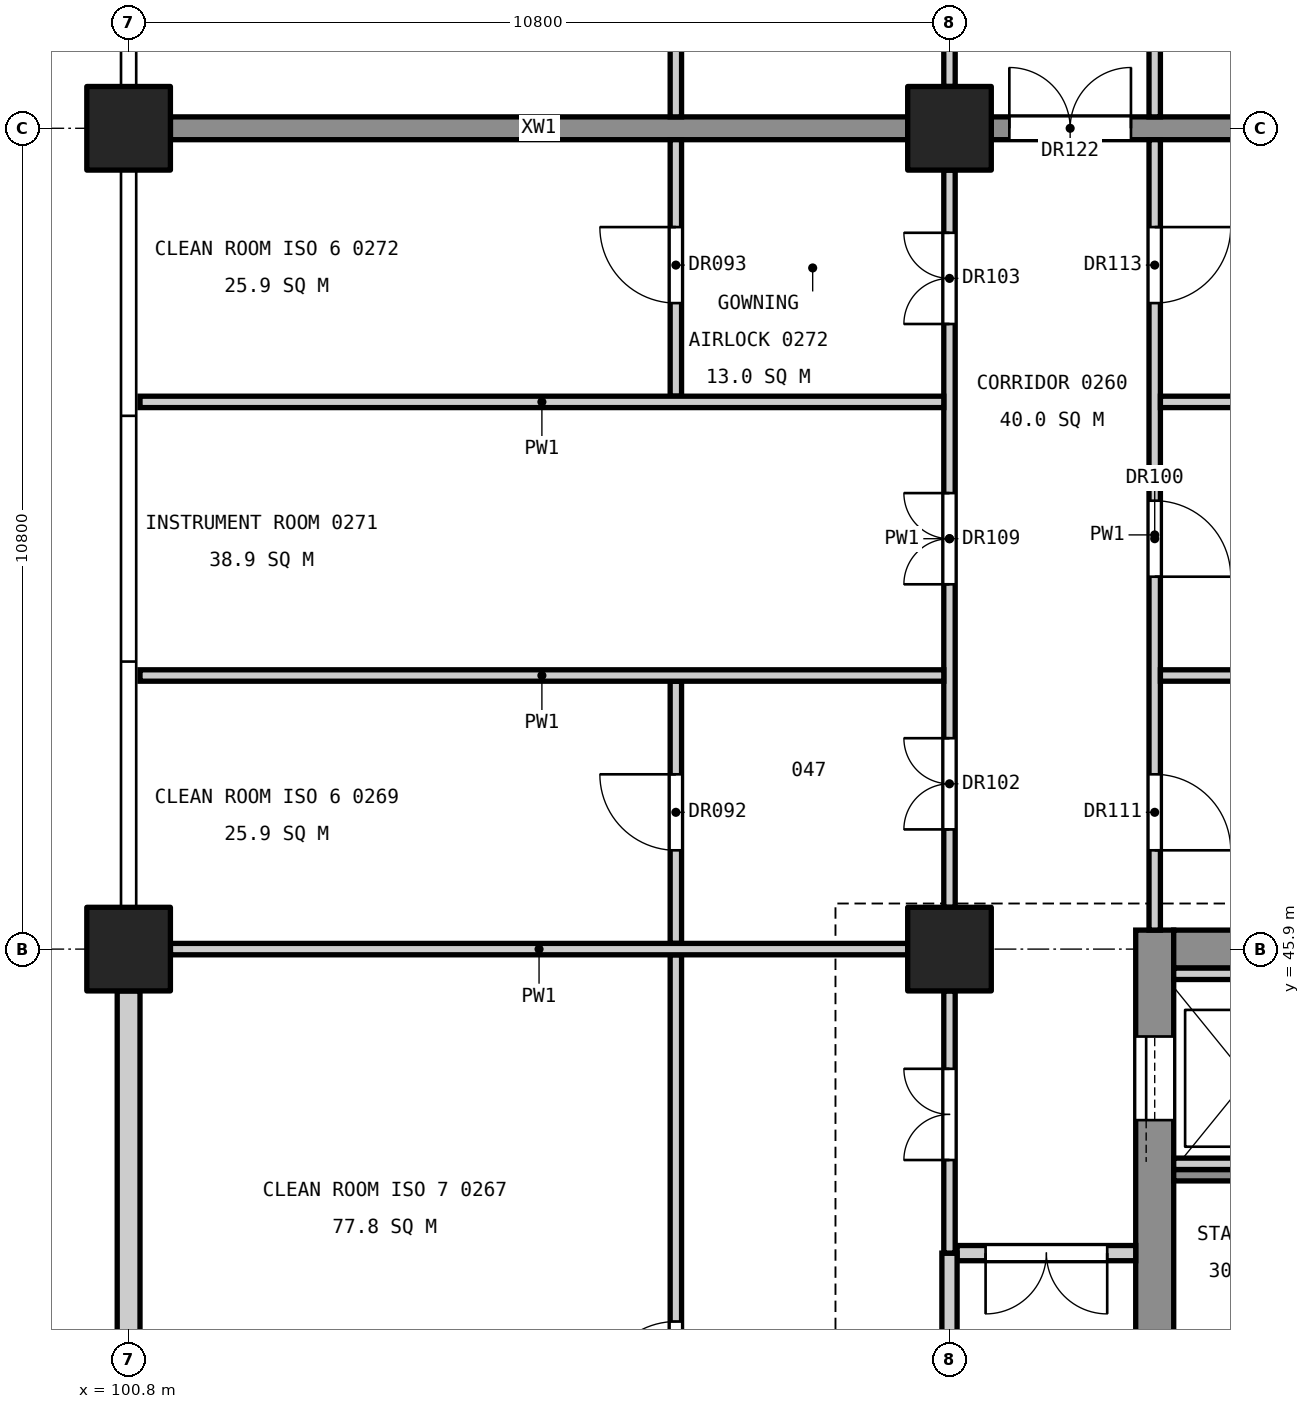
"""IFC4 building model, lengths in metres.
Left out: names, types, materials, properties, quantities, classifications, styles, units other than length and angle.
Written with IfcOpenShell. Run it as: python <this file> out.ifc"""

import sys

from ifc_helpers import new_model, si_unit, direction, frame, frame_2d, origin, origin_2d, place, context, subcontext, project, spatial, rectangle, extrude, element, fill, save


model = new_model("IFC4")
c1 = context("Model", 3, precision=1e-05, world=origin(), true_north=direction((0.0, 1.0)))
c2 = subcontext(c1, "Body", "Model", "MODEL_VIEW")
j1 = project(units=[si_unit("LENGTHUNIT", "METRE"), si_unit("PLANEANGLEUNIT", "RADIAN")], contexts=[c1])
p1 = place(None, origin())
s1 = spatial("IfcSite", under=j1, at=p1, CompositionType="ELEMENT")
p2 = place(p1, origin())
s2 = spatial("IfcBuilding", under=s1, at=p2, CompositionType="ELEMENT")
p3 = place(p2, frame((0.0, 0.0, 11.4)))
s3 = spatial("IfcBuildingStorey", under=s2, at=p3, CompositionType="ELEMENT", Elevation=11.4)
for number, where, z_axis, x_axis in (
    (1, (111.6, 45.9, 0.0), (0.0, 0.0, 1.0), (1.0, 0.0, 0.0)),
    (2, (111.6, 56.7, 0.0), (0.0, 0.0, 1.0), (1.0, 0.0, 0.0)),
    (3, (100.8, 45.9, 0.0), (0.0, 0.0, 1.0), (1.0, 0.0, 0.0)),
    (4, (100.8, 56.7, 0.0), (0.0, 0.0, 1.0), (1.0, 0.0, 0.0)),
):
    element("IfcColumn", number, at=place(p3, frame(where, z_axis=z_axis, x_axis=x_axis)), inside=s3, PredefinedType="COLUMN", context=c2, shape_type="SweptSolid", body=[
        extrude(rectangle(XDim=1.1, YDim=1.1, at=origin_2d()), origin(), (0.0, 0.0, 1.0), 5.4),
    ])
p4 = place(p3, frame((114.3, 34.85, 0.0), z_axis=(0.0, 0.0, 1.0), x_axis=(0.0, 1.0, 0.0)))
e5 = element("IfcWall", 5, at=p4, inside=s3, PredefinedType="SHEAR", context=c2, shape_type="SweptSolid", body=[
    extrude(rectangle(XDim=11.3, YDim=0.5, at=frame_2d((5.65, 0.0))), origin(), (0.0, 0.0, 1.0), 5.1),
])
p5 = place(p4, frame((0.55, 0.0, 0.0)))
e6 = element("IfcOpeningElement", 6, at=p5, cuts=e5, PredefinedType="OPENING", context=c2, shape_type="SweptSolid", body=[
    extrude(rectangle(XDim=1.4, YDim=2.1, at=frame_2d((0.7, 1.05))), frame((0.0, 0.26, 0.0), z_axis=(0.0, -1.0, 0.0), x_axis=(1.0, 0.0, 0.0)), (0.0, 0.0, 1.0), 0.52),
])
p6 = place(p4, frame((8.8, 0.0, 0.0)))
e7 = element("IfcOpeningElement", 7, at=p6, cuts=e5, PredefinedType="OPENING", context=c2, shape_type="SweptSolid", body=[
    extrude(rectangle(XDim=1.1, YDim=2.1, at=frame_2d((0.55, 1.05))), frame((0.0, 0.26, 0.0), z_axis=(0.0, -1.0, 0.0), x_axis=(1.0, 0.0, 0.0)), (0.0, 0.0, 1.0), 0.52),
])
p7 = place(p3, frame((118.55, 45.9, 0.0), z_axis=(0.0, 0.0, 1.0), x_axis=(-1.0, 0.0, 0.0)))
e8 = element("IfcWall", 8, at=p7, inside=s3, PredefinedType="SHEAR", context=c2, shape_type="SweptSolid", body=[
    extrude(rectangle(XDim=4.0, YDim=0.5, at=frame_2d((2.0, 0.0))), origin(), (0.0, 0.0, 1.0), 5.1),
])
p8 = place(p3, frame((118.25, 56.7, 0.0), z_axis=(0.0, 0.0, 1.0), x_axis=(-1.0, 0.0, 0.0)))
e9 = element("IfcWall", 9, at=p8, inside=s3, PredefinedType="SHEAR", context=c2, shape_type="SweptSolid", body=[
    extrude(rectangle(XDim=6.1, YDim=0.3, at=frame_2d((3.05, 0.0))), origin(), (0.0, 0.0, 1.0), 5.1),
])
p9 = place(p8, frame((4.262, 0.0, 0.0)))
e10 = element("IfcOpeningElement", 10, at=p9, cuts=e9, PredefinedType="OPENING", context=c2, shape_type="SweptSolid", body=[
    extrude(rectangle(XDim=1.6, YDim=2.1, at=frame_2d((0.8, 1.05))), frame((0.0, 0.16, 0.0), z_axis=(0.0, -1.0, 0.0), x_axis=(1.0, 0.0, 0.0)), (0.0, 0.0, 1.0), 0.32),
])
p10 = place(p3, frame((111.05, 56.7, 0.0), z_axis=(0.0, 0.0, 1.0), x_axis=(-1.0, 0.0, 0.0)))
e11 = element("IfcWall", 11, at=p10, inside=s3, PredefinedType="SHEAR", context=c2, shape_type="SweptSolid", body=[
    extrude(rectangle(XDim=9.7, YDim=0.3, at=frame_2d((4.85, 0.0))), origin(), (0.0, 0.0, 1.0), 5.1),
])
p11 = place(p3, frame((118.55, 42.925, 0.0), z_axis=(0.0, 0.0, 1.0), x_axis=(-1.0, 0.0, 0.0)))
e12 = element("IfcWall", 12, at=p11, inside=s3, PredefinedType="SOLIDWALL", context=c2, shape_type="SweptSolid", body=[
    extrude(rectangle(XDim=4.0, YDim=0.15, at=frame_2d((2.0, 0.0))), origin(), (0.0, 0.0, 1.0), 5.1),
])
for number, where, z_axis, x_axis in (
    (13, (116.35, 43.075, 0.0), (0.0, 0.0, 1.0), (-1.0, 0.0, 0.0)),
    (14, (116.35, 45.575, 0.0), (0.0, 0.0, 1.0), (-1.0, 0.0, 0.0)),
):
    element("IfcWall", number, at=place(p3, frame(where, z_axis=z_axis, x_axis=x_axis)), inside=s3, PredefinedType="SOLIDWALL", context=c2, shape_type="SweptSolid", body=[
        extrude(rectangle(XDim=1.8, YDim=0.15, at=frame_2d((0.9, 0.0))), origin(), (0.0, 0.0, 1.0), 5.4),
    ])
p12 = place(p3, frame((100.8, 35.65, 0.0), z_axis=(0.0, 0.0, 1.0), x_axis=(0.0, 1.0, 0.0)))
e15 = element("IfcWall", 15, at=p12, inside=s3, PredefinedType="STANDARD", context=c2, shape_type="SweptSolid", body=[
    extrude(rectangle(XDim=9.7, YDim=0.3, at=frame_2d((4.85, 0.0))), origin(), (0.0, 0.0, 1.0), 4.0),
])
p13 = place(p3, frame((114.3, 46.15, 0.0), z_axis=(0.0, 0.0, 1.0), x_axis=(0.0, 1.0, 0.0)))
e16 = element("IfcWall", 16, at=p13, inside=s3, PredefinedType="PARTITIONING", context=c2, shape_type="SweptSolid", body=[
    extrude(rectangle(XDim=10.4, YDim=0.15, at=frame_2d((5.2, 0.0))), origin(), (0.0, 0.0, 1.0), 4.0),
])
p14 = place(p13, frame((4.65, 0.0, 0.0)))
e17 = element("IfcOpeningElement", 17, at=p14, cuts=e16, PredefinedType="OPENING", context=c2, shape_type="SweptSolid", body=[
    extrude(rectangle(XDim=1.0, YDim=2.1, at=frame_2d((0.5, 1.05))), frame((0.0, 0.085, 0.0), z_axis=(0.0, -1.0, 0.0), x_axis=(1.0, 0.0, 0.0)), (0.0, 0.0, 1.0), 0.17),
])
p15 = place(p13, frame((1.05, 0.0, 0.0)))
e18 = element("IfcOpeningElement", 18, at=p15, cuts=e16, PredefinedType="OPENING", context=c2, shape_type="SweptSolid", body=[
    extrude(rectangle(XDim=1.0, YDim=2.1, at=frame_2d((0.5, 1.05))), frame((0.0, 0.085, 0.0), z_axis=(0.0, -1.0, 0.0), x_axis=(1.0, 0.0, 0.0)), (0.0, 0.0, 1.0), 0.17),
])
p16 = place(p13, frame((8.25, 0.0, 0.0)))
e19 = element("IfcOpeningElement", 19, at=p16, cuts=e16, PredefinedType="OPENING", context=c2, shape_type="SweptSolid", body=[
    extrude(rectangle(XDim=1.0, YDim=2.1, at=frame_2d((0.5, 1.05))), frame((0.0, 0.085, 0.0), z_axis=(0.0, -1.0, 0.0), x_axis=(1.0, 0.0, 0.0)), (0.0, 0.0, 1.0), 0.17),
])
p17 = place(p3, frame((114.3, 56.85, 0.0), z_axis=(0.0, 0.0, 1.0), x_axis=(0.0, 1.0, 0.0)))
e20 = element("IfcWall", 20, at=p17, inside=s3, PredefinedType="PARTITIONING", context=c2, shape_type="SweptSolid", body=[
    extrude(rectangle(XDim=3.2, YDim=0.15, at=frame_2d((1.6, 0.0))), origin(), (0.0, 0.0, 1.0), 4.0),
])
p18 = place(p17, frame((1.15, 0.0, 0.0)))
e21 = element("IfcOpeningElement", 21, at=p18, cuts=e20, PredefinedType="OPENING", context=c2, shape_type="SweptSolid", body=[
    extrude(rectangle(XDim=1.0, YDim=2.1, at=frame_2d((0.5, 1.05))), frame((0.0, 0.085, 0.0), z_axis=(0.0, -1.0, 0.0), x_axis=(1.0, 0.0, 0.0)), (0.0, 0.0, 1.0), 0.17),
])
for number, where, z_axis, x_axis in (
    (22, (118.65, 49.5, 0.0), (0.0, 0.0, 1.0), (-1.0, 0.0, 0.0)),
    (23, (118.65, 53.1, 0.0), (0.0, 0.0, 1.0), (-1.0, 0.0, 0.0)),
):
    element("IfcWall", number, at=place(p3, frame(where, z_axis=z_axis, x_axis=x_axis)), inside=s3, PredefinedType="PARTITIONING", context=c2, shape_type="SweptSolid", body=[
        extrude(rectangle(XDim=4.275, YDim=0.15, at=frame_2d((2.137, 0.0))), origin(), (0.0, 0.0, 1.0), 4.3),
    ])
p19 = place(p3, frame((114.05, 41.9, 0.0), z_axis=(0.0, 0.0, 1.0), x_axis=(-1.0, 0.0, 0.0)))
e24 = element("IfcWall", 24, at=p19, inside=s3, PredefinedType="PARTITIONING", context=c2, shape_type="SweptSolid", body=[
    extrude(rectangle(XDim=2.35, YDim=0.2, at=frame_2d((1.175, 0.0))), origin(), (0.0, 0.0, 1.0), 4.0),
])
p20 = place(p19, frame((0.375, 0.0, 0.0)))
e25 = element("IfcOpeningElement", 25, at=p20, cuts=e24, PredefinedType="OPENING", context=c2, shape_type="SweptSolid", body=[
    extrude(rectangle(XDim=1.6, YDim=2.1, at=frame_2d((0.8, 1.05))), frame((0.0, 0.11, 0.0), z_axis=(0.0, -1.0, 0.0), x_axis=(1.0, 0.0, 0.0)), (0.0, 0.0, 1.0), 0.22),
])
p21 = place(p3, frame((111.6, 35.65, 0.0), z_axis=(0.0, 0.0, 1.0), x_axis=(0.0, 1.0, 0.0)))
e26 = element("IfcWall", 26, at=p21, inside=s3, PredefinedType="PARTITIONING", context=c2, shape_type="SweptSolid", body=[
    extrude(rectangle(XDim=6.25, YDim=0.2, at=frame_2d((3.125, 0.0))), origin(), (0.0, 0.0, 1.0), 4.0),
])
p22 = place(p3, frame((111.6, 41.9, 0.0), z_axis=(0.0, 0.0, 1.0), x_axis=(0.0, 1.0, 0.0)))
e27 = element("IfcWall", 27, at=p22, inside=s3, PredefinedType="PARTITIONING", context=c2, shape_type="SweptSolid", body=[
    extrude(rectangle(XDim=3.45, YDim=0.15, at=frame_2d((1.725, 0.0))), origin(), (0.0, 0.0, 1.0), 4.0),
])
p23 = place(p22, frame((1.225, 0.0, 0.0)))
e28 = element("IfcOpeningElement", 28, at=p23, cuts=e27, PredefinedType="OPENING", context=c2, shape_type="SweptSolid", body=[
    extrude(rectangle(XDim=1.2, YDim=2.1, at=frame_2d((0.6, 1.05))), frame((0.0, 0.085, 0.0), z_axis=(0.0, -1.0, 0.0), x_axis=(1.0, 0.0, 0.0)), (0.0, 0.0, 1.0), 0.17),
])
p24 = place(p3, frame((111.6, 46.45, 0.0), z_axis=(0.0, 0.0, 1.0), x_axis=(0.0, 1.0, 0.0)))
e29 = element("IfcWall", 29, at=p24, inside=s3, PredefinedType="PARTITIONING", context=c2, shape_type="SweptSolid", body=[
    extrude(rectangle(XDim=9.7, YDim=0.15, at=frame_2d((4.85, 0.0))), origin(), (0.0, 0.0, 1.0), 4.0),
])
p25 = place(p24, frame((1.025, 0.0, 0.0)))
e30 = element("IfcOpeningElement", 30, at=p25, cuts=e29, PredefinedType="OPENING", context=c2, shape_type="SweptSolid", body=[
    extrude(rectangle(XDim=1.2, YDim=2.1, at=frame_2d((0.6, 1.05))), frame((0.0, 0.085, 0.0), z_axis=(0.0, -1.0, 0.0), x_axis=(1.0, 0.0, 0.0)), (0.0, 0.0, 1.0), 0.17),
])
p26 = place(p24, frame((7.675, 0.0, 0.0)))
e31 = element("IfcOpeningElement", 31, at=p26, cuts=e29, PredefinedType="OPENING", context=c2, shape_type="SweptSolid", body=[
    extrude(rectangle(XDim=1.2, YDim=2.1, at=frame_2d((0.6, 1.05))), frame((0.0, 0.085, 0.0), z_axis=(0.0, -1.0, 0.0), x_axis=(1.0, 0.0, 0.0)), (0.0, 0.0, 1.0), 0.17),
])
p27 = place(p24, frame((4.25, 0.0, 0.0)))
e32 = element("IfcOpeningElement", 32, at=p27, cuts=e29, PredefinedType="OPENING", context=c2, shape_type="SweptSolid", body=[
    extrude(rectangle(XDim=1.2, YDim=2.1, at=frame_2d((0.6, 1.05))), frame((0.0, 0.085, 0.0), z_axis=(0.0, -1.0, 0.0), x_axis=(1.0, 0.0, 0.0)), (0.0, 0.0, 1.0), 0.17),
])
p28 = place(p3, frame((111.6, 57.25, 0.0), z_axis=(0.0, 0.0, 1.0), x_axis=(0.0, 1.0, 0.0)))
e33 = element("IfcWall", 33, at=p28, inside=s3, PredefinedType="PARTITIONING", context=c2, shape_type="SweptSolid", body=[
    extrude(rectangle(XDim=3.05, YDim=0.15, at=frame_2d((1.525, 0.0))), origin(), (0.0, 0.0, 1.0), 4.0),
])
p29 = place(p28, frame((1.025, 0.0, 0.0)))
e34 = element("IfcOpeningElement", 34, at=p29, cuts=e33, PredefinedType="OPENING", context=c2, shape_type="SweptSolid", body=[
    extrude(rectangle(XDim=1.2, YDim=2.1, at=frame_2d((0.6, 1.05))), frame((0.0, 0.085, 0.0), z_axis=(0.0, -1.0, 0.0), x_axis=(1.0, 0.0, 0.0)), (0.0, 0.0, 1.0), 0.17),
])
p30 = place(p3, frame((108.0, 35.25, 0.0), z_axis=(0.0, 0.0, 1.0), x_axis=(0.0, 1.0, 0.0)))
e35 = element("IfcWall", 35, at=p30, inside=s3, PredefinedType="PARTITIONING", context=c2, shape_type="SweptSolid", body=[
    extrude(rectangle(XDim=10.575, YDim=0.15, at=frame_2d((5.288, 0.0))), origin(), (0.0, 0.0, 1.0), 4.0),
])
p31 = place(p30, frame((4.75, 0.0, 0.0)))
e36 = element("IfcOpeningElement", 36, at=p31, cuts=e35, PredefinedType="OPENING", context=c2, shape_type="SweptSolid", body=[
    extrude(rectangle(XDim=1.0, YDim=2.1, at=frame_2d((0.5, 1.05))), frame((0.0, 0.085, 0.0), z_axis=(0.0, -1.0, 0.0), x_axis=(1.0, 0.0, 0.0)), (0.0, 0.0, 1.0), 0.17),
])
p32 = place(p3, frame((108.0, 45.975, 0.0), z_axis=(0.0, 0.0, 1.0), x_axis=(0.0, 1.0, 0.0)))
e37 = element("IfcWall", 37, at=p32, inside=s3, PredefinedType="PARTITIONING", context=c2, shape_type="SweptSolid", body=[
    extrude(rectangle(XDim=3.45, YDim=0.15, at=frame_2d((1.725, 0.0))), origin(), (0.0, 0.0, 1.0), 4.0),
])
p33 = place(p32, frame((1.225, 0.0, 0.0)))
e38 = element("IfcOpeningElement", 38, at=p33, cuts=e37, PredefinedType="OPENING", context=c2, shape_type="SweptSolid", body=[
    extrude(rectangle(XDim=1.0, YDim=2.1, at=frame_2d((0.5, 1.05))), frame((0.0, 0.085, 0.0), z_axis=(0.0, -1.0, 0.0), x_axis=(1.0, 0.0, 0.0)), (0.0, 0.0, 1.0), 0.17),
])
p34 = place(p3, frame((108.0, 53.175, 0.0), z_axis=(0.0, 0.0, 1.0), x_axis=(0.0, 1.0, 0.0)))
e39 = element("IfcWall", 39, at=p34, inside=s3, PredefinedType="PARTITIONING", context=c2, shape_type="SweptSolid", body=[
    extrude(rectangle(XDim=3.375, YDim=0.15, at=frame_2d((1.688, 0.0))), origin(), (0.0, 0.0, 1.0), 4.0),
])
p35 = place(p34, frame((1.225, 0.0, 0.0)))
e40 = element("IfcOpeningElement", 40, at=p35, cuts=e39, PredefinedType="OPENING", context=c2, shape_type="SweptSolid", body=[
    extrude(rectangle(XDim=1.0, YDim=2.1, at=frame_2d((0.5, 1.05))), frame((0.0, 0.085, 0.0), z_axis=(0.0, -1.0, 0.0), x_axis=(1.0, 0.0, 0.0)), (0.0, 0.0, 1.0), 0.17),
])
p36 = place(p3, frame((108.0, 56.85, 0.0), z_axis=(0.0, 0.0, 1.0), x_axis=(0.0, 1.0, 0.0)))
e41 = element("IfcWall", 41, at=p36, inside=s3, PredefinedType="PARTITIONING", context=c2, shape_type="SweptSolid", body=[
    extrude(rectangle(XDim=6.975, YDim=0.15, at=frame_2d((3.487, 0.0))), origin(), (0.0, 0.0, 1.0), 4.0),
])
p37 = place(p36, frame((2.95, 0.0, 0.0)))
e42 = element("IfcOpeningElement", 42, at=p37, cuts=e41, PredefinedType="OPENING", context=c2, shape_type="SweptSolid", body=[
    extrude(rectangle(XDim=1.0, YDim=2.1, at=frame_2d((0.5, 1.05))), frame((0.0, 0.085, 0.0), z_axis=(0.0, -1.0, 0.0), x_axis=(1.0, 0.0, 0.0)), (0.0, 0.0, 1.0), 0.17),
])
p38 = place(p3, frame((111.05, 45.9, 0.0), z_axis=(0.0, 0.0, 1.0), x_axis=(-1.0, 0.0, 0.0)))
e43 = element("IfcWall", 43, at=p38, inside=s3, PredefinedType="PARTITIONING", context=c2, shape_type="SweptSolid", body=[
    extrude(rectangle(XDim=9.7, YDim=0.15, at=frame_2d((4.85, 0.0))), origin(), (0.0, 0.0, 1.0), 4.3),
])
for number, where, z_axis, x_axis in (
    (44, (111.525, 49.5, 0.0), (0.0, 0.0, 1.0), (-1.0, 0.0, 0.0)),
    (45, (111.525, 53.1, 0.0), (0.0, 0.0, 1.0), (-1.0, 0.0, 0.0)),
):
    element("IfcWall", number, at=place(p3, frame(where, z_axis=z_axis, x_axis=x_axis)), inside=s3, PredefinedType="PARTITIONING", context=c2, shape_type="SweptSolid", body=[
        extrude(rectangle(XDim=10.575, YDim=0.15, at=frame_2d((5.288, 0.0))), origin(), (0.0, 0.0, 1.0), 4.3),
    ])
p39 = place(p6, origin())
e46 = element("IfcDoor", 46, at=p39, inside=s3, OperationType="SLIDING_TO_LEFT", PredefinedType="DOOR", context=c2, shape_type="SweptSolid", body=[
    extrude(rectangle(XDim=1.1, YDim=2.1, at=frame_2d((0.55, 1.05))), frame((0.0, 0.025, 0.0), z_axis=(0.0, -1.0, 0.0), x_axis=(1.0, 0.0, 0.0)), (0.0, 0.0, 1.0), 0.05),
])
fill(e7, e46)
p40 = place(p33, origin())
e47 = element("IfcDoor", 47, at=p40, inside=s3, OperationType="SINGLE_SWING_RIGHT", PredefinedType="DOOR", context=c2, shape_type="SweptSolid", body=[
    extrude(rectangle(XDim=1.0, YDim=2.1, at=frame_2d((0.5, 1.05))), frame((0.0, 0.025, 0.0), z_axis=(0.0, -1.0, 0.0), x_axis=(1.0, 0.0, 0.0)), (0.0, 0.0, 1.0), 0.05),
])
fill(e38, e47)
p41 = place(p35, origin())
e48 = element("IfcDoor", 48, at=p41, inside=s3, OperationType="SINGLE_SWING_RIGHT", PredefinedType="DOOR", context=c2, shape_type="SweptSolid", body=[
    extrude(rectangle(XDim=1.0, YDim=2.1, at=frame_2d((0.5, 1.05))), frame((0.0, 0.025, 0.0), z_axis=(0.0, -1.0, 0.0), x_axis=(1.0, 0.0, 0.0)), (0.0, 0.0, 1.0), 0.05),
])
fill(e40, e48)
p42 = place(p31, origin())
e49 = element("IfcDoor", 49, at=p42, inside=s3, OperationType="SINGLE_SWING_LEFT", PredefinedType="DOOR", context=c2, shape_type="SweptSolid", body=[
    extrude(rectangle(XDim=1.0, YDim=2.1, at=frame_2d((0.5, 1.05))), frame((0.0, 0.025, 0.0), z_axis=(0.0, -1.0, 0.0), x_axis=(1.0, 0.0, 0.0)), (0.0, 0.0, 1.0), 0.05),
])
fill(e36, e49)
p43 = place(p14, frame((1.0, 0.0, 0.0), z_axis=(0.0, 0.0, 1.0), x_axis=(-1.0, 0.0, 0.0)))
e50 = element("IfcDoor", 50, at=p43, inside=s3, OperationType="SINGLE_SWING_RIGHT", PredefinedType="DOOR", context=c2, shape_type="SweptSolid", body=[
    extrude(rectangle(XDim=1.0, YDim=2.1, at=frame_2d((0.5, 1.05))), frame((0.0, 0.025, 0.0), z_axis=(0.0, -1.0, 0.0), x_axis=(1.0, 0.0, 0.0)), (0.0, 0.0, 1.0), 0.05),
])
fill(e17, e50)
p44 = place(p23, origin())
e51 = element("IfcDoor", 51, at=p44, inside=s3, OperationType="DOUBLE_DOOR_SINGLE_SWING", PredefinedType="DOOR", context=c2, shape_type="SweptSolid", body=[
    extrude(rectangle(XDim=1.2, YDim=2.1, at=frame_2d((0.6, 1.05))), frame((0.0, 0.025, 0.0), z_axis=(0.0, -1.0, 0.0), x_axis=(1.0, 0.0, 0.0)), (0.0, 0.0, 1.0), 0.05),
])
fill(e28, e51)
p45 = place(p25, origin())
e52 = element("IfcDoor", 52, at=p45, inside=s3, OperationType="DOUBLE_DOOR_SINGLE_SWING", PredefinedType="DOOR", context=c2, shape_type="SweptSolid", body=[
    extrude(rectangle(XDim=1.2, YDim=2.1, at=frame_2d((0.6, 1.05))), frame((0.0, 0.025, 0.0), z_axis=(0.0, -1.0, 0.0), x_axis=(1.0, 0.0, 0.0)), (0.0, 0.0, 1.0), 0.05),
])
fill(e30, e52)
p46 = place(p26, origin())
e53 = element("IfcDoor", 53, at=p46, inside=s3, OperationType="DOUBLE_DOOR_SINGLE_SWING", PredefinedType="DOOR", context=c2, shape_type="SweptSolid", body=[
    extrude(rectangle(XDim=1.2, YDim=2.1, at=frame_2d((0.6, 1.05))), frame((0.0, 0.025, 0.0), z_axis=(0.0, -1.0, 0.0), x_axis=(1.0, 0.0, 0.0)), (0.0, 0.0, 1.0), 0.05),
])
fill(e31, e53)
p47 = place(p27, origin())
e54 = element("IfcDoor", 54, at=p47, inside=s3, OperationType="DOUBLE_DOOR_SINGLE_SWING", PredefinedType="DOOR", context=c2, shape_type="SweptSolid", body=[
    extrude(rectangle(XDim=1.2, YDim=2.1, at=frame_2d((0.6, 1.05))), frame((0.0, 0.025, 0.0), z_axis=(0.0, -1.0, 0.0), x_axis=(1.0, 0.0, 0.0)), (0.0, 0.0, 1.0), 0.05),
])
fill(e32, e54)
p48 = place(p15, frame((1.0, 0.0, 0.0), z_axis=(0.0, 0.0, 1.0), x_axis=(-1.0, 0.0, 0.0)))
e55 = element("IfcDoor", 55, at=p48, inside=s3, OperationType="SINGLE_SWING_RIGHT", PredefinedType="DOOR", context=c2, shape_type="SweptSolid", body=[
    extrude(rectangle(XDim=1.0, YDim=2.1, at=frame_2d((0.5, 1.05))), frame((0.0, 0.025, 0.0), z_axis=(0.0, -1.0, 0.0), x_axis=(1.0, 0.0, 0.0)), (0.0, 0.0, 1.0), 0.05),
])
fill(e18, e55)
p49 = place(p16, frame((1.0, 0.0, 0.0), z_axis=(0.0, 0.0, 1.0), x_axis=(-1.0, 0.0, 0.0)))
e56 = element("IfcDoor", 56, at=p49, inside=s3, OperationType="SINGLE_SWING_LEFT", PredefinedType="DOOR", context=c2, shape_type="SweptSolid", body=[
    extrude(rectangle(XDim=1.0, YDim=2.1, at=frame_2d((0.5, 1.05))), frame((0.0, 0.025, 0.0), z_axis=(0.0, -1.0, 0.0), x_axis=(1.0, 0.0, 0.0)), (0.0, 0.0, 1.0), 0.05),
])
fill(e19, e56)
p50 = place(p20, origin())
e57 = element("IfcDoor", 57, at=p50, inside=s3, OperationType="DOUBLE_DOOR_SINGLE_SWING", PredefinedType="DOOR", context=c2, shape_type="SweptSolid", body=[
    extrude(rectangle(XDim=1.6, YDim=2.1, at=frame_2d((0.8, 1.05))), frame((0.0, 0.025, 0.0), z_axis=(0.0, -1.0, 0.0), x_axis=(1.0, 0.0, 0.0)), (0.0, 0.0, 1.0), 0.05),
])
fill(e25, e57)
p51 = place(p9, frame((1.6, 0.0, 0.0), z_axis=(0.0, 0.0, 1.0), x_axis=(-1.0, 0.0, 0.0)))
e58 = element("IfcDoor", 58, at=p51, inside=s3, OperationType="DOUBLE_DOOR_SINGLE_SWING", PredefinedType="DOOR", context=c2, shape_type="SweptSolid", body=[
    extrude(rectangle(XDim=1.6, YDim=2.1, at=frame_2d((0.8, 1.05))), frame((0.0, 0.025, 0.0), z_axis=(0.0, -1.0, 0.0), x_axis=(1.0, 0.0, 0.0)), (0.0, 0.0, 1.0), 0.05),
])
fill(e10, e58)
save(model, sys.argv[1])
